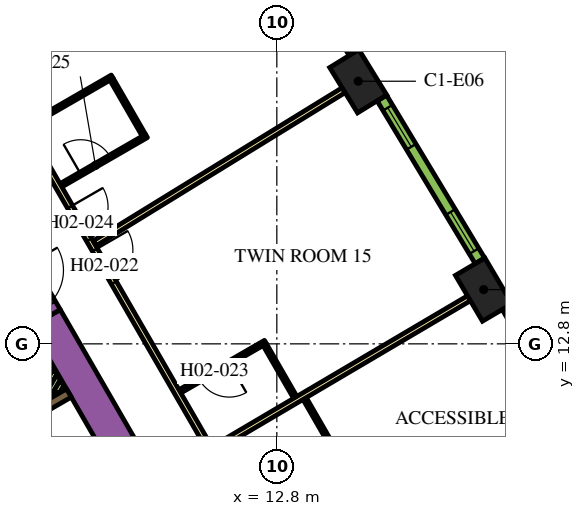
"""IFC4 building model, lengths in metres.
Left out: names, types, materials, properties, quantities, classifications, styles, units other than length and angle.
Written with IfcOpenShell. Run it as: python <this file> out.ifc"""

import sys

from ifc_helpers import new_model, si_unit, direction, frame, frame_2d, origin, origin_2d, place, context, subcontext, project, spatial, rectangle, extrude, element, fill, save


model = new_model("IFC4")
c1 = context("Model", 3, precision=1e-05, world=origin(), true_north=direction((0.0, 1.0)))
c2 = subcontext(c1, "Body", "Model", "MODEL_VIEW")
j1 = project(units=[si_unit("LENGTHUNIT", "METRE"), si_unit("PLANEANGLEUNIT", "RADIAN")], contexts=[c1])
p1 = place(None, origin())
s1 = spatial("IfcSite", under=j1, at=p1, CompositionType="ELEMENT")
p2 = place(p1, origin())
s2 = spatial("IfcBuilding", under=s1, at=p2, CompositionType="ELEMENT")
p3 = place(p2, frame((0.0, 0.0, 39.3)))
s3 = spatial("IfcBuildingStorey", under=s2, at=p3, CompositionType="ELEMENT", Elevation=39.3)
for number, where, z_axis, x_axis in (
    (1, (18.243, 14.228, 0.0), (0.0, 0.0, 1.0), (-0.508, 0.861, 0.0)),
    (2, (14.942, 19.71, 0.0), (0.0, 0.0, 1.0), (-0.524, 0.852, 0.0)),
):
    element("IfcColumn", number, at=place(p3, frame(where, z_axis=z_axis, x_axis=x_axis)), inside=s3, PredefinedType="COLUMN", context=c2, shape_type="SweptSolid", body=[
        extrude(rectangle(XDim=1.4, YDim=0.9, at=origin_2d()), origin(), (0.0, 0.0, 1.0), 3.9),
    ])
p4 = place(p3, frame((6.711, 13.476, 0.0), z_axis=(0.0, 0.0, 1.0), x_axis=(0.500002723396, -0.866023831425, 0.0)))
e3 = element("IfcWall", 3, at=p4, inside=s3, PredefinedType="SOLIDWALL", context=c2, shape_type="SweptSolid", body=[
    extrude(rectangle(XDim=20.334, YDim=0.9, at=frame_2d((10.167, 0.0))), origin(), (0.0, 0.0, 1.0), 3.9),
])
p5 = place(p3, frame((5.356, 10.367, 0.0), z_axis=(0.0, 0.0, 1.0), x_axis=(0.865978535641, 0.50008116922, 0.0)))
e4 = element("IfcWall", 4, at=p5, inside=s3, PredefinedType="SOLIDWALL", context=c2, shape_type="SweptSolid", body=[
    extrude(rectangle(XDim=2.278, YDim=0.25, at=frame_2d((1.139, 0.0))), origin(), (0.0, 0.0, 1.0), 3.9),
])
p6 = place(p3, frame((6.482, 11.225, 0.0), z_axis=(0.0, 0.0, 1.0), x_axis=(0.5001061818, 0.865964091014, 0.0)))
e5 = element("IfcWall", 5, at=p6, inside=s3, PredefinedType="PARTITIONING", context=c2, shape_type="SweptSolid", body=[
    extrude(rectangle(XDim=0.973, YDim=0.15, at=frame_2d((0.486, 0.0))), origin(), (0.0, 0.0, 1.0), 2.75),
])
p7 = place(p3, frame((6.742, 11.375, 0.0), z_axis=(0.0, 0.0, 1.0), x_axis=(0.499744951064, 0.86617260629, 0.0)))
e6 = element("IfcWall", 6, at=p7, inside=s3, PredefinedType="PARTITIONING", context=c2, shape_type="SweptSolid", body=[
    extrude(rectangle(XDim=0.626, YDim=0.15, at=frame_2d((0.313, 0.0))), origin(), (0.0, 0.0, 1.0), 2.75),
])
p8 = place(p3, frame((7.001, 11.525, 0.0), z_axis=(0.0, 0.0, 1.0), x_axis=(0.499797962495, 0.866142018774, 0.0)))
e7 = element("IfcWall", 7, at=p8, inside=s3, PredefinedType="PARTITIONING", context=c2, shape_type="SweptSolid", body=[
    extrude(rectangle(XDim=0.28, YDim=0.15, at=frame_2d((0.14, 0.0))), origin(), (0.0, 0.0, 1.0), 2.75),
])
p9 = place(p3, frame((5.861, 14.948, 0.0), z_axis=(0.0, 0.0, 1.0), x_axis=(0.500062241894, -0.865989465428, 0.0)))
e8 = element("IfcWall", 8, at=p9, inside=s3, PredefinedType="SOLIDWALL", context=c2, shape_type="SweptSolid", body=[
    extrude(rectangle(XDim=1.7, YDim=0.9, at=frame_2d((0.85, 0.0))), origin(), (0.0, 0.0, 1.0), 3.9),
])
p10 = place(p9, frame((0.25, 0.0, 0.0)))
e9 = element("IfcOpeningElement", 9, at=p10, cuts=e8, PredefinedType="OPENING", context=c2, shape_type="SweptSolid", body=[
    extrude(rectangle(XDim=1.2, YDim=2.1, at=frame_2d((0.6, 1.05))), frame((0.0, 0.46, 0.0), z_axis=(0.0, -1.0, 0.0), x_axis=(1.0, 0.0, 0.0)), (0.0, 0.0, 1.0), 0.92),
])
p11 = place(p3, frame((6.163, 18.475, 0.0), z_axis=(0.0, 0.0, 1.0), x_axis=(0.500001317485, -0.866024643133, 0.0)))
e10 = element("IfcWall", 10, at=p11, inside=s3, PredefinedType="PARTITIONING", context=c2, shape_type="SweptSolid", body=[
    extrude(rectangle(XDim=25.767, YDim=0.15, at=frame_2d((12.883, 0.0))), origin(), (0.0, 0.0, 1.0), 2.75),
])
p12 = place(p11, frame((24.586, 0.0, 0.0)))
e11 = element("IfcOpeningElement", 11, at=p12, cuts=e10, PredefinedType="OPENING", context=c2, shape_type="SweptSolid", body=[
    extrude(rectangle(XDim=1.0, YDim=2.1, at=frame_2d((0.5, 1.05))), frame((0.0, 0.085, 0.0), z_axis=(0.0, -1.0, 0.0), x_axis=(1.0, 0.0, 0.0)), (0.0, 0.0, 1.0), 0.17),
])
p13 = place(p11, frame((16.196, 0.0, 0.0)))
e12 = element("IfcOpeningElement", 12, at=p13, cuts=e10, PredefinedType="OPENING", context=c2, shape_type="SweptSolid", body=[
    extrude(rectangle(XDim=1.0, YDim=2.1, at=frame_2d((0.5, 1.05))), frame((0.0, 0.085, 0.0), z_axis=(0.0, -1.0, 0.0), x_axis=(1.0, 0.0, 0.0)), (0.0, 0.0, 1.0), 0.17),
])
p14 = place(p11, frame((14.789, 0.0, 0.0)))
e13 = element("IfcOpeningElement", 13, at=p14, cuts=e10, PredefinedType="OPENING", context=c2, shape_type="SweptSolid", body=[
    extrude(rectangle(XDim=1.1, YDim=2.1, at=frame_2d((0.55, 1.05))), frame((0.0, 0.085, 0.0), z_axis=(0.0, -1.0, 0.0), x_axis=(1.0, 0.0, 0.0)), (0.0, 0.0, 1.0), 0.17),
])
p15 = place(p11, frame((3.698, 0.0, 0.0)))
e14 = element("IfcOpeningElement", 14, at=p15, cuts=e10, PredefinedType="OPENING", context=c2, shape_type="SweptSolid", body=[
    extrude(rectangle(XDim=1.0, YDim=2.1, at=frame_2d((0.5, 1.05))), frame((0.0, 0.085, 0.0), z_axis=(0.0, -1.0, 0.0), x_axis=(1.0, 0.0, 0.0)), (0.0, 0.0, 1.0), 0.17),
])
p16 = place(p11, frame((2.391, 0.0, 0.0)))
e15 = element("IfcOpeningElement", 15, at=p16, cuts=e10, PredefinedType="OPENING", context=c2, shape_type="SweptSolid", body=[
    extrude(rectangle(XDim=1.0, YDim=2.1, at=frame_2d((0.5, 1.05))), frame((0.0, 0.085, 0.0), z_axis=(0.0, -1.0, 0.0), x_axis=(1.0, 0.0, 0.0)), (0.0, 0.0, 1.0), 0.17),
])
p17 = place(p3, frame((11.16, 24.888, 0.0), z_axis=(0.0, 0.0, 1.0), x_axis=(-0.84199813156, -0.539480441211, 0.0)))
e16 = element("IfcWall", 16, at=p17, inside=s3, PredefinedType="PARTITIONING", context=c2, shape_type="SweptSolid", body=[
    extrude(rectangle(XDim=11.638, YDim=0.15, at=frame_2d((5.819, 0.0))), origin(), (0.0, 0.0, 1.0), 2.75),
])
p18 = place(p3, frame((14.558, 19.475, 0.0), z_axis=(0.0, 0.0, 1.0), x_axis=(-0.851829455142, -0.523819223925, 0.0)))
e17 = element("IfcWall", 17, at=p18, inside=s3, PredefinedType="PARTITIONING", context=c2, shape_type="SweptSolid", body=[
    extrude(rectangle(XDim=7.688, YDim=0.15, at=frame_2d((3.844, 0.0))), origin(), (0.0, 0.0, 1.0), 2.75),
])
p19 = place(p3, frame((17.856, 13.999, 0.0), z_axis=(0.0, 0.0, 1.0), x_axis=(-0.861371519381, -0.507975497047, 0.0)))
e18 = element("IfcWall", 18, at=p19, inside=s3, PredefinedType="PARTITIONING", context=c2, shape_type="SweptSolid", body=[
    extrude(rectangle(XDim=7.804, YDim=0.15, at=frame_2d((3.902, 0.0))), origin(), (0.0, 0.0, 1.0), 2.75),
])
p20 = place(p3, frame((14.759, 9.237, 0.0), z_axis=(0.0, 0.0, 1.0), x_axis=(-0.499943856944, 0.866057815567, 0.0)))
e19 = element("IfcWall", 19, at=p20, inside=s3, PredefinedType="PARTITIONING", context=c2, shape_type="SweptSolid", body=[
    extrude(rectangle(XDim=2.45, YDim=0.1, at=frame_2d((1.225, 0.0))), origin(), (0.0, 0.0, 1.0), 2.75),
])
p21 = place(p3, frame((12.5, 12.849, 0.0), z_axis=(0.0, 0.0, 1.0), x_axis=(-0.866021400173, -0.500006934395, 0.0)))
e20 = element("IfcWall", 20, at=p21, inside=s3, PredefinedType="PARTITIONING", context=c2, shape_type="SweptSolid", body=[
    extrude(rectangle(XDim=2.6, YDim=0.1, at=frame_2d((1.3, 0.0))), origin(), (0.0, 0.0, 1.0), 2.75),
])
p22 = place(p21, frame((1.1, 0.0, 0.0)))
e21 = element("IfcOpeningElement", 21, at=p22, cuts=e20, PredefinedType="OPENING", context=c2, shape_type="SweptSolid", body=[
    extrude(rectangle(XDim=0.9, YDim=2.1, at=frame_2d((0.45, 1.05))), frame((0.0, 0.06, 0.0), z_axis=(0.0, -1.0, 0.0), x_axis=(1.0, 0.0, 0.0)), (0.0, 0.0, 1.0), 0.12),
])
p23 = place(p3, frame((12.482, 12.781, 0.0), z_axis=(0.0, 0.0, 1.0), x_axis=(0.500061482766, -0.865989903783, 0.0)))
e22 = element("IfcWall", 22, at=p23, inside=s3, PredefinedType="PARTITIONING", context=c2, shape_type="SweptSolid", body=[
    extrude(rectangle(XDim=1.6, YDim=0.1, at=frame_2d((0.8, 0.0))), origin(), (0.0, 0.0, 1.0), 2.75),
])
p24 = place(p3, frame((7.118, 16.971, 0.0), z_axis=(0.0, 0.0, 1.0), x_axis=(0.866021400173, 0.500006934395, 0.0)))
e23 = element("IfcWall", 23, at=p24, inside=s3, PredefinedType="PARTITIONING", context=c2, shape_type="SweptSolid", body=[
    extrude(rectangle(XDim=2.6, YDim=0.1, at=frame_2d((1.3, 0.0))), origin(), (0.0, 0.0, 1.0), 2.75),
])
p25 = place(p24, frame((0.6, 0.0, 0.0)))
e24 = element("IfcOpeningElement", 24, at=p25, cuts=e23, PredefinedType="OPENING", context=c2, shape_type="SweptSolid", body=[
    extrude(rectangle(XDim=0.9, YDim=2.1, at=frame_2d((0.45, 1.05))), frame((0.0, 0.06, 0.0), z_axis=(0.0, -1.0, 0.0), x_axis=(1.0, 0.0, 0.0)), (0.0, 0.0, 1.0), 0.12),
])
p26 = place(p3, frame((9.302, 18.289, 0.0), z_axis=(0.0, 0.0, 1.0), x_axis=(-0.500062241894, 0.865989465428, 0.0)))
e25 = element("IfcWall", 25, at=p26, inside=s3, PredefinedType="PARTITIONING", context=c2, shape_type="SweptSolid", body=[
    extrude(rectangle(XDim=1.7, YDim=0.1, at=frame_2d((0.85, 0.0))), origin(), (0.0, 0.0, 1.0), 2.75),
])
p27 = place(p3, frame((6.218, 18.53, 0.0), z_axis=(0.0, 0.0, 1.0), x_axis=(0.865997922154, 0.500047596559, 0.0)))
e26 = element("IfcWall", 26, at=p27, inside=s3, PredefinedType="PARTITIONING", context=c2, shape_type="SweptSolid", body=[
    extrude(rectangle(XDim=2.6, YDim=0.1, at=frame_2d((1.3, 0.0))), origin(), (0.0, 0.0, 1.0), 2.75),
])
p28 = place(p3, frame((21.357, 9.445, 0.0), z_axis=(0.0, 0.0, 1.0), x_axis=(-0.50002123722, 0.866013142123, 0.0)))
e27 = element("IfcWall", 27, at=p28, inside=s3, PredefinedType="SOLIDWALL", context=c2, shape_type="SweptSolid", body=[
    extrude(rectangle(XDim=4.998, YDim=0.29, at=frame_2d((2.499, 0.0))), origin(), (0.0, 0.0, 1.0), 3.65),
])
p29 = place(p28, frame((0.297, 0.0, 0.9)))
e28 = element("IfcOpeningElement", 28, at=p29, cuts=e27, PredefinedType="OPENING", context=c2, shape_type="SweptSolid", body=[
    extrude(rectangle(XDim=1.2, YDim=2.15, at=frame_2d((0.6, 1.075))), frame((0.0, 0.155, 0.0), z_axis=(0.0, -1.0, 0.0), x_axis=(1.0, 0.0, 0.0)), (0.0, 0.0, 1.0), 0.31),
])
p30 = place(p28, frame((3.501, 0.0, 0.9)))
e29 = element("IfcOpeningElement", 29, at=p30, cuts=e27, PredefinedType="OPENING", context=c2, shape_type="SweptSolid", body=[
    extrude(rectangle(XDim=1.2, YDim=2.15, at=frame_2d((0.6, 1.075))), frame((0.0, 0.155, 0.0), z_axis=(0.0, -1.0, 0.0), x_axis=(1.0, 0.0, 0.0)), (0.0, 0.0, 1.0), 0.31),
])
p31 = place(p3, frame((18.143, 14.986, 0.0), z_axis=(0.0, 0.0, 1.0), x_axis=(-0.515938796285, 0.856625448191, 0.0)))
e30 = element("IfcWall", 30, at=p31, inside=s3, PredefinedType="SOLIDWALL", context=c2, shape_type="SweptSolid", body=[
    extrude(rectangle(XDim=4.998, YDim=0.29, at=frame_2d((2.499, 0.0))), origin(), (0.0, 0.0, 1.0), 3.65),
])
p32 = place(p31, frame((0.297, 0.0, 0.9)))
e31 = element("IfcOpeningElement", 31, at=p32, cuts=e30, PredefinedType="OPENING", context=c2, shape_type="SweptSolid", body=[
    extrude(rectangle(XDim=1.2, YDim=2.15, at=frame_2d((0.6, 1.075))), frame((0.0, 0.155, 0.0), z_axis=(0.0, -1.0, 0.0), x_axis=(1.0, 0.0, 0.0)), (0.0, 0.0, 1.0), 0.31),
])
p33 = place(p31, frame((3.501, 0.0, 0.9)))
e32 = element("IfcOpeningElement", 32, at=p33, cuts=e30, PredefinedType="OPENING", context=c2, shape_type="SweptSolid", body=[
    extrude(rectangle(XDim=1.2, YDim=2.15, at=frame_2d((0.6, 1.075))), frame((0.0, 0.155, 0.0), z_axis=(0.0, -1.0, 0.0), x_axis=(1.0, 0.0, 0.0)), (0.0, 0.0, 1.0), 0.31),
])
p34 = place(p3, frame((14.827, 20.466, 0.0), z_axis=(0.0, 0.0, 1.0), x_axis=(-0.531688286542, 0.846940119462, 0.0)))
e33 = element("IfcWall", 33, at=p34, inside=s3, PredefinedType="SOLIDWALL", context=c2, shape_type="SweptSolid", body=[
    extrude(rectangle(XDim=4.998, YDim=0.29, at=frame_2d((2.499, 0.0))), origin(), (0.0, 0.0, 1.0), 3.65),
])
p35 = place(p34, frame((0.297, 0.0, 0.9)))
e34 = element("IfcOpeningElement", 34, at=p35, cuts=e33, PredefinedType="OPENING", context=c2, shape_type="SweptSolid", body=[
    extrude(rectangle(XDim=1.2, YDim=2.15, at=frame_2d((0.6, 1.075))), frame((0.0, 0.155, 0.0), z_axis=(0.0, -1.0, 0.0), x_axis=(1.0, 0.0, 0.0)), (0.0, 0.0, 1.0), 0.31),
])
p36 = place(p34, frame((3.501, 0.0, 0.9)))
e35 = element("IfcOpeningElement", 35, at=p36, cuts=e33, PredefinedType="OPENING", context=c2, shape_type="SweptSolid", body=[
    extrude(rectangle(XDim=1.2, YDim=2.15, at=frame_2d((0.6, 1.075))), frame((0.0, 0.155, 0.0), z_axis=(0.0, -1.0, 0.0), x_axis=(1.0, 0.0, 0.0)), (0.0, 0.0, 1.0), 0.31),
])
p37 = place(p15, origin())
e36 = element("IfcDoor", 36, at=p37, inside=s3, OperationType="SINGLE_SWING_LEFT", PredefinedType="DOOR", context=c2, shape_type="SweptSolid", body=[
    extrude(rectangle(XDim=1.0, YDim=2.1, at=frame_2d((0.5, 1.05))), frame((0.0, 0.025, 0.0), z_axis=(0.0, -1.0, 0.0), x_axis=(1.0, 0.0, 0.0)), (0.0, 0.0, 1.0), 0.05),
])
fill(e14, e36)
p38 = place(p22, origin())
e37 = element("IfcDoor", 37, at=p38, inside=s3, OperationType="SINGLE_SWING_RIGHT", PredefinedType="DOOR", context=c2, shape_type="SweptSolid", body=[
    extrude(rectangle(XDim=0.9, YDim=2.1, at=frame_2d((0.45, 1.05))), frame((0.0, 0.025, 0.0), z_axis=(0.0, -1.0, 0.0), x_axis=(1.0, 0.0, 0.0)), (0.0, 0.0, 1.0), 0.05),
])
fill(e21, e37)
p39 = place(p16, origin())
e38 = element("IfcDoor", 38, at=p39, inside=s3, OperationType="SINGLE_SWING_RIGHT", PredefinedType="DOOR", context=c2, shape_type="SweptSolid", body=[
    extrude(rectangle(XDim=1.0, YDim=2.1, at=frame_2d((0.5, 1.05))), frame((0.0, 0.025, 0.0), z_axis=(0.0, -1.0, 0.0), x_axis=(1.0, 0.0, 0.0)), (0.0, 0.0, 1.0), 0.05),
])
fill(e15, e38)
p40 = place(p25, origin())
e39 = element("IfcDoor", 39, at=p40, inside=s3, OperationType="SINGLE_SWING_LEFT", PredefinedType="DOOR", context=c2, shape_type="SweptSolid", body=[
    extrude(rectangle(XDim=0.9, YDim=2.1, at=frame_2d((0.45, 1.05))), frame((0.0, 0.025, 0.0), z_axis=(0.0, -1.0, 0.0), x_axis=(1.0, 0.0, 0.0)), (0.0, 0.0, 1.0), 0.05),
])
fill(e24, e39)
p41 = place(p32, origin())
e40 = element("IfcWindow", 40, at=p41, inside=s3, PartitioningType="DOUBLE_PANEL_VERTICAL", PredefinedType="WINDOW", context=c2, shape_type="SweptSolid", body=[
    extrude(rectangle(XDim=1.2, YDim=2.15, at=frame_2d((0.6, 1.075))), frame((0.0, 0.015, 0.0), z_axis=(0.0, -1.0, 0.0), x_axis=(1.0, 0.0, 0.0)), (0.0, 0.0, 1.0), 0.06),
])
fill(e31, e40)
p42 = place(p33, origin())
e41 = element("IfcWindow", 41, at=p42, inside=s3, PartitioningType="DOUBLE_PANEL_VERTICAL", PredefinedType="WINDOW", context=c2, shape_type="SweptSolid", body=[
    extrude(rectangle(XDim=1.2, YDim=2.15, at=frame_2d((0.6, 1.075))), frame((0.0, 0.015, 0.0), z_axis=(0.0, -1.0, 0.0), x_axis=(1.0, 0.0, 0.0)), (0.0, 0.0, 1.0), 0.06),
])
fill(e32, e41)
save(model, sys.argv[1])
